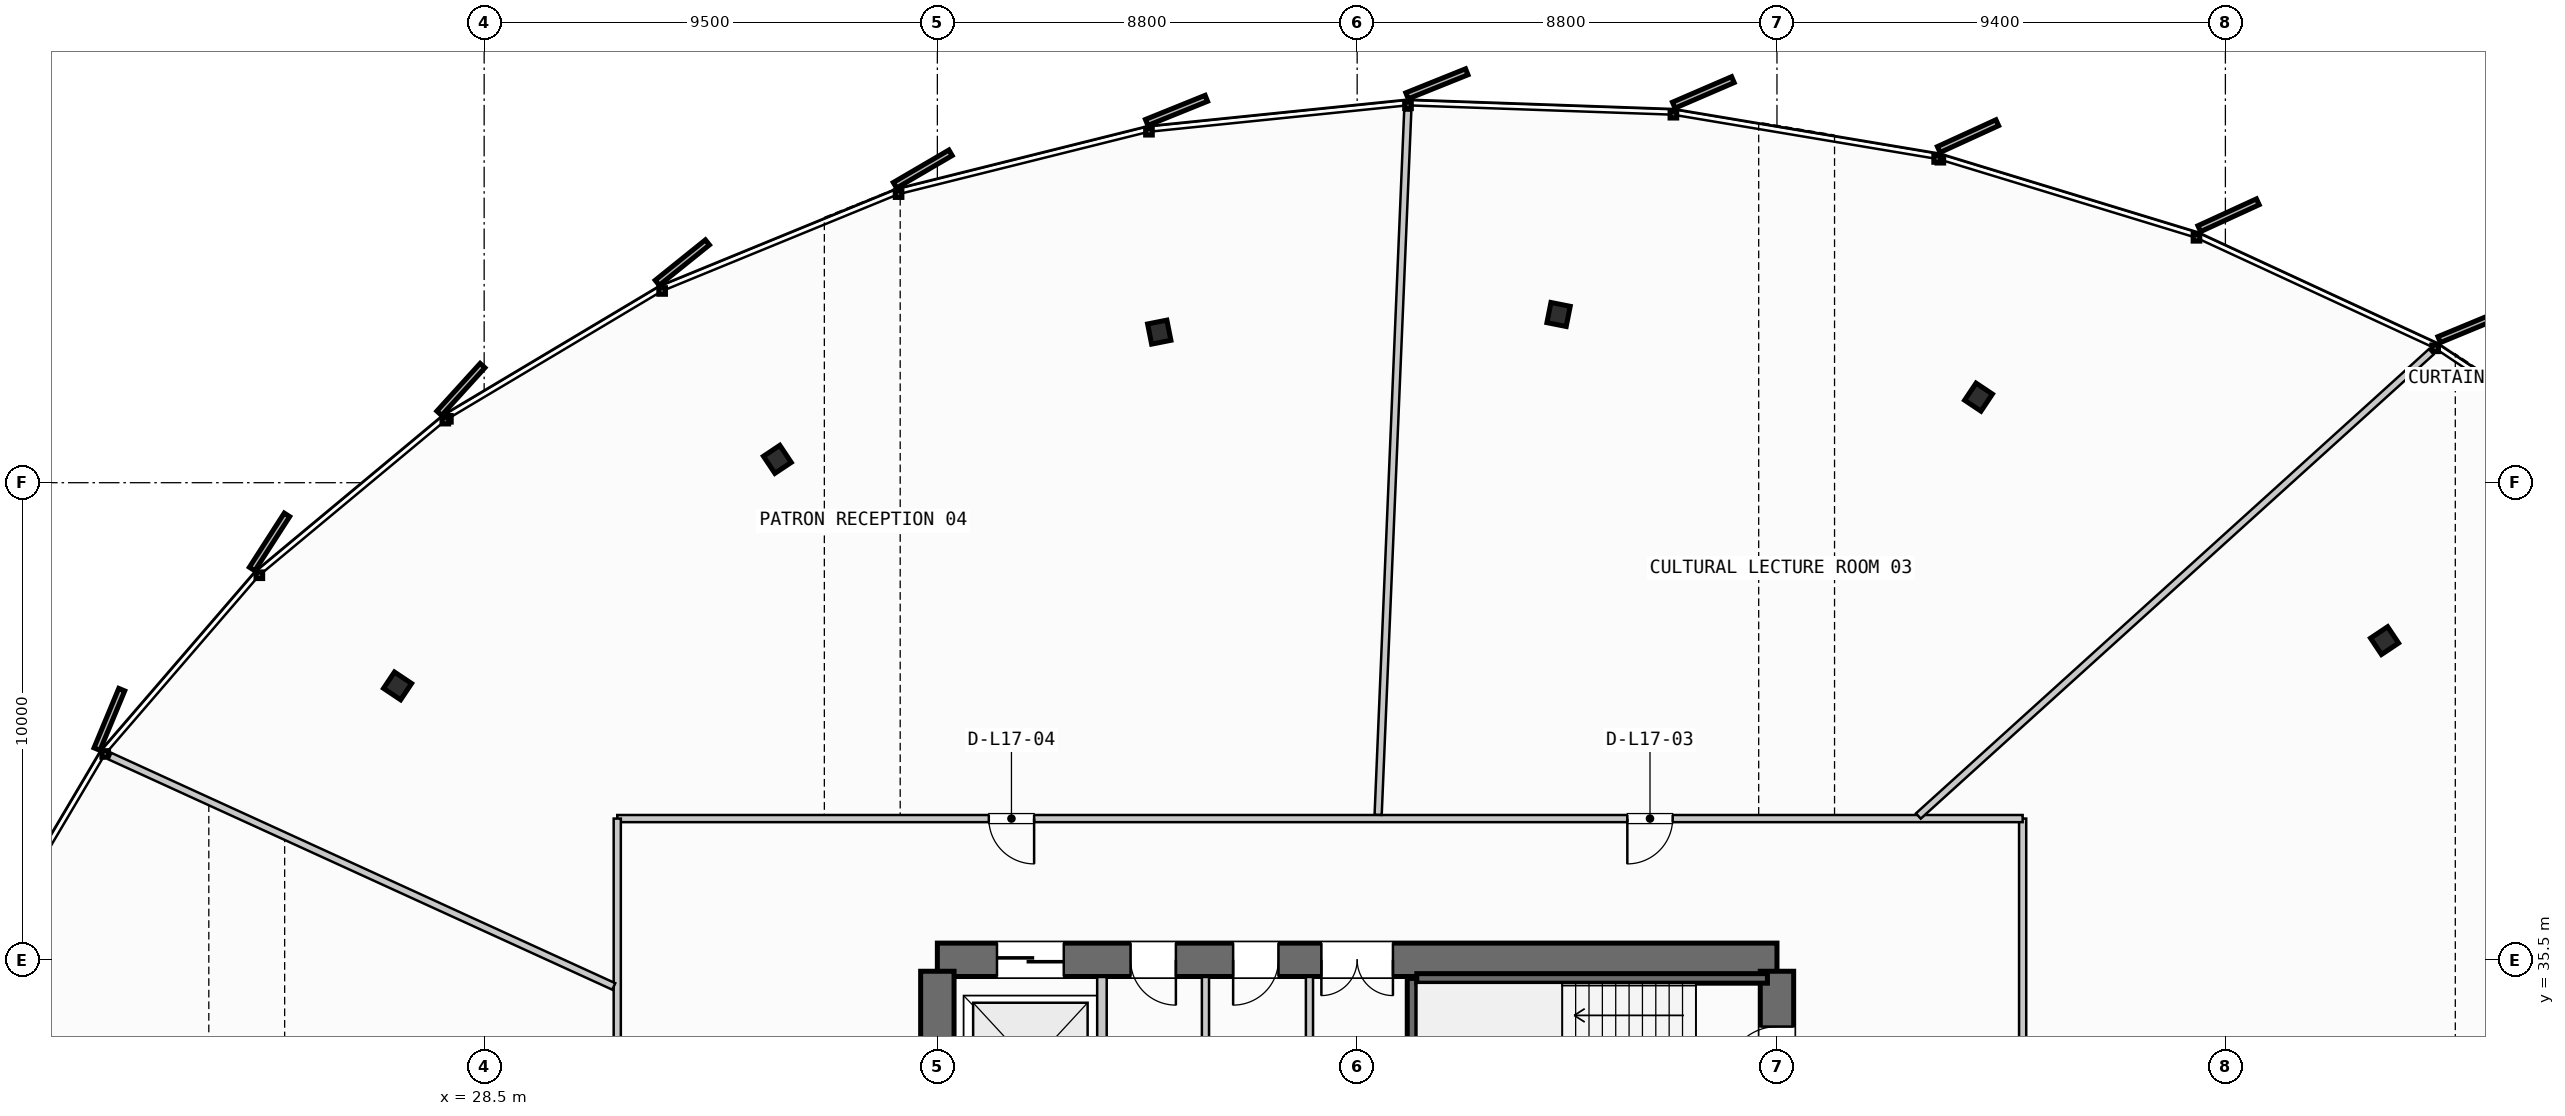
"""IFC4 building model, lengths in metres.
Left out: names, types, materials, properties, quantities, classifications, styles, units other than length and angle.
Written with IfcOpenShell. Run it as: python <this file> out.ifc"""

import sys

from ifc_helpers import new_model, si_unit, direction, frame, frame_2d, origin, origin_2d, place, context, subcontext, project, spatial, rectangle, i_section, extrude, source, transform, mapped, element, fill, save


model = new_model("IFC4")
c1 = context("Model", 3, precision=1e-05, world=origin(), true_north=direction((0.0, 1.0)))
c2 = subcontext(c1, "Body", "Model", "MODEL_VIEW")
j1 = project(units=[si_unit("LENGTHUNIT", "METRE"), si_unit("PLANEANGLEUNIT", "RADIAN")], contexts=[c1])
p1 = place(None, origin())
s1 = spatial("IfcSite", under=j1, at=p1, CompositionType="ELEMENT")
p2 = place(p1, origin())
s2 = spatial("IfcBuilding", under=s1, at=p2, CompositionType="ELEMENT")
p3 = place(p2, frame((0.0, 0.0, 71.4)))
s3 = spatial("IfcBuildingStorey", under=s2, at=p3, CompositionType="ELEMENT", Elevation=71.4)
p4 = place(p3, frame((55.6, 35.5, 0.0), z_axis=(0.0, 0.0, 1.0), x_axis=(-1.0, 0.0, 0.0)))
e1 = element("IfcWall", 1, at=p4, inside=s3, PredefinedType="SHEAR", context=c2, shape_type="SweptSolid", body=[
    extrude(rectangle(XDim=17.6, YDim=0.7, at=frame_2d((8.8, 0.0))), origin(), (0.0, 0.0, 1.0), 3.54),
])
p5 = place(p4, frame((8.05, 0.0, 0.0)))
e2 = element("IfcOpeningElement", 2, at=p5, cuts=e1, PredefinedType="OPENING", context=c2, shape_type="SweptSolid", body=[
    extrude(rectangle(XDim=1.5, YDim=2.2, at=frame_2d((0.75, 1.1))), frame((0.0, 0.36, 0.0), z_axis=(0.0, -1.0, 0.0), x_axis=(1.0, 0.0, 0.0)), (0.0, 0.0, 1.0), 0.72),
])
p6 = place(p4, frame((14.95, 0.0, 0.0)))
e3 = element("IfcOpeningElement", 3, at=p6, cuts=e1, PredefinedType="OPENING", context=c2, shape_type="SweptSolid", body=[
    extrude(rectangle(XDim=1.4, YDim=2.3, at=frame_2d((0.7, 1.15))), frame((0.0, 0.36, 0.0), z_axis=(0.0, -1.0, 0.0), x_axis=(1.0, 0.0, 0.0)), (0.0, 0.0, 1.0), 0.72),
])
p7 = place(p4, frame((12.6, 0.0, 0.0)))
e4 = element("IfcOpeningElement", 4, at=p7, cuts=e1, PredefinedType="OPENING", context=c2, shape_type="SweptSolid", body=[
    extrude(rectangle(XDim=0.95, YDim=2.15, at=frame_2d((0.475, 1.075))), frame((0.0, 0.36, 0.0), z_axis=(0.0, -1.0, 0.0), x_axis=(1.0, 0.0, 0.0)), (0.0, 0.0, 1.0), 0.72),
])
p8 = place(p4, frame((10.45, 0.0, 0.0)))
e5 = element("IfcOpeningElement", 5, at=p8, cuts=e1, PredefinedType="OPENING", context=c2, shape_type="SweptSolid", body=[
    extrude(rectangle(XDim=0.95, YDim=2.15, at=frame_2d((0.475, 1.075))), frame((0.0, 0.36, 0.0), z_axis=(0.0, -1.0, 0.0), x_axis=(1.0, 0.0, 0.0)), (0.0, 0.0, 1.0), 0.72),
])
p9 = place(p3, frame((38.0, 35.26, 0.0), z_axis=(0.0, 0.0, 1.0), x_axis=(0.0, -1.0, 0.0)))
e6 = element("IfcWall", 6, at=p9, inside=s3, PredefinedType="SHEAR", context=c2, shape_type="SweptSolid", body=[
    extrude(rectangle(XDim=14.92, YDim=0.7, at=frame_2d((7.46, 0.0))), origin(), (0.0, 0.0, 1.0), 3.54),
])
p10 = place(p9, frame((5.21, 0.0, 0.0)))
e7 = element("IfcOpeningElement", 7, at=p10, cuts=e6, PredefinedType="OPENING", context=c2, shape_type="SweptSolid", body=[
    extrude(rectangle(XDim=1.1, YDim=2.2, at=frame_2d((0.55, 1.1))), frame((0.0, 0.36, 0.0), z_axis=(0.0, -1.0, 0.0), x_axis=(1.0, 0.0, 0.0)), (0.0, 0.0, 1.0), 0.72),
])
p11 = place(p3, frame((55.6, 20.34, 0.0), z_axis=(0.0, 0.0, 1.0), x_axis=(0.0, 1.0, 0.0)))
e8 = element("IfcWall", 8, at=p11, inside=s3, PredefinedType="SHEAR", context=c2, shape_type="SweptSolid", body=[
    extrude(rectangle(XDim=14.92, YDim=0.7, at=frame_2d((7.46, 0.0))), origin(), (0.0, 0.0, 1.0), 3.54),
])
p12 = place(p11, frame((12.71, 0.0, 0.0)))
e9 = element("IfcOpeningElement", 9, at=p12, cuts=e8, PredefinedType="OPENING", context=c2, shape_type="SweptSolid", body=[
    extrude(rectangle(XDim=1.05, YDim=2.15, at=frame_2d((0.525, 1.075))), frame((0.0, 0.36, 0.0), z_axis=(0.0, -1.0, 0.0), x_axis=(1.0, 0.0, 0.0)), (0.0, 0.0, 1.0), 0.72),
])
p13 = place(p11, frame((8.61, 0.0, 0.0)))
e10 = element("IfcOpeningElement", 10, at=p13, cuts=e8, PredefinedType="OPENING", context=c2, shape_type="SweptSolid", body=[
    extrude(rectangle(XDim=1.1, YDim=2.2, at=frame_2d((0.55, 1.1))), frame((0.0, 0.36, 0.0), z_axis=(0.0, -1.0, 0.0), x_axis=(1.0, 0.0, 0.0)), (0.0, 0.0, 1.0), 0.72),
])
m1 = source(origin(), c2, "Body", "SweptSolid", [
    extrude(i_section(OverallWidth=0.412, OverallDepth=0.431, WebThickness=0.042, FlangeThickness=0.068, FilletRadius=0.015, at=origin_2d()), origin(), (0.0, 0.0, 1.0), 3.54),
])
for number, where, z_axis, x_axis in (
    (11, (68.336, 42.19, 0.0), (0.0, 0.0, 1.0), (0.831, 0.556, 0.0)),
    (12, (59.825, 47.293, 0.0), (0.0, 0.0, 1.0), (0.556, 0.831, 0.0)),
    (13, (51.022, 49.026, 0.0), (0.0, 0.0, 1.0), (0.195, 0.981, 0.0)),
    (14, (42.652, 48.656, 0.0), (0.0, 0.0, 1.0), (-0.195, 0.981, 0.0)),
    (15, (34.646, 45.99, 0.0), (0.0, 0.0, 1.0), (-0.556, 0.831, 0.0)),
    (16, (26.685, 41.241, 0.0), (0.0, 0.0, 1.0), (-0.831, 0.556, 0.0)),
):
    element("IfcColumn", number, at=place(p3, frame(where, z_axis=z_axis, x_axis=x_axis)), inside=s3, PredefinedType="COLUMN", context=c2, shape_type="MappedRepresentation", body=[
        mapped(m1, transform((0.0, 0.0, 0.0), scale=1.0)),
    ])
p14 = place(p3, frame((47.95, 32.05, 0.0), z_axis=(0.0, 0.0, 1.0), x_axis=(0.0, 1.0, 0.0)))
e17 = element("IfcWall", 17, at=p14, inside=s3, PredefinedType="SHEAR", context=c2, shape_type="SweptSolid", body=[
    extrude(rectangle(XDim=3.06, YDim=0.2, at=frame_2d((1.53, 0.0))), origin(), (0.0, 0.0, 1.0), 3.54),
])
p15 = place(p3, frame((48.05, 35.11, 0.0), z_axis=(0.0, 0.0, 1.0), x_axis=(1.0, 0.0, 0.0)))
e18 = element("IfcWall", 18, at=p15, inside=s3, PredefinedType="SHEAR", context=c2, shape_type="SweptSolid", body=[
    extrude(rectangle(XDim=7.35, YDim=0.2, at=frame_2d((3.675, 0.0))), origin(), (0.0, 0.0, 1.0), 3.54),
])
p16 = place(p3, frame((41.45, 31.85, 0.0), z_axis=(0.0, 0.0, 1.0), x_axis=(0.0, 1.0, 0.0)))
e19 = element("IfcWall", 19, at=p16, inside=s3, PredefinedType="PARTITIONING", context=c2, shape_type="SweptSolid", body=[
    extrude(rectangle(XDim=3.29, YDim=0.2, at=frame_2d((1.645, 0.0))), origin(), (0.0, 0.0, 1.0), 2.495),
])
p17 = place(p3, frame((45.8, 31.85, 0.0), z_axis=(0.0, 0.0, 1.0), x_axis=(0.0, 1.0, 0.0)))
e20 = element("IfcWall", 20, at=p17, inside=s3, PredefinedType="PARTITIONING", context=c2, shape_type="SweptSolid", body=[
    extrude(rectangle(XDim=3.29, YDim=0.15, at=frame_2d((1.645, 0.0))), origin(), (0.0, 0.0, 1.0), 2.495),
])
p18 = place(p3, frame((43.62, 31.85, 0.0), z_axis=(0.0, 0.0, 1.0), x_axis=(0.0, 1.0, 0.0)))
e21 = element("IfcWall", 21, at=p18, inside=s3, PredefinedType="PLUMBINGWALL", context=c2, shape_type="SweptSolid", body=[
    extrude(rectangle(XDim=3.29, YDim=0.15, at=frame_2d((1.645, 0.0))), origin(), (0.0, 0.0, 1.0), 2.495),
])
p19 = place(p3, frame((60.75, 17.14, 0.0), z_axis=(0.0, 0.0, 1.0), x_axis=(0.0, 1.0, 0.0)))
e22 = element("IfcWall", 22, at=p19, inside=s3, PredefinedType="PARTITIONING", context=c2, shape_type="SweptSolid", body=[
    extrude(rectangle(XDim=21.32, YDim=0.15, at=frame_2d((10.66, 0.0))), origin(), (0.0, 0.0, 1.0), 2.495),
])
p20 = place(p19, frame((12.321, 0.0, 0.0)))
e23 = element("IfcOpeningElement", 23, at=p20, cuts=e22, PredefinedType="OPENING", context=c2, shape_type="SweptSolid", body=[
    extrude(rectangle(XDim=0.95, YDim=2.15, at=frame_2d((0.475, 1.075))), frame((0.0, 0.085, 0.0), z_axis=(0.0, -1.0, 0.0), x_axis=(1.0, 0.0, 0.0)), (0.0, 0.0, 1.0), 0.17),
])
p21 = place(p3, frame((60.75, 38.46, 0.0), z_axis=(0.0, 0.0, 1.0), x_axis=(-1.0, 0.0, 0.0)))
e24 = element("IfcWall", 24, at=p21, inside=s3, PredefinedType="PARTITIONING", context=c2, shape_type="SweptSolid", body=[
    extrude(rectangle(XDim=29.46, YDim=0.15, at=frame_2d((14.73, 0.0))), origin(), (0.0, 0.0, 1.0), 2.495),
])
p22 = place(p21, frame((7.337, 0.0, 0.0)))
e25 = element("IfcOpeningElement", 25, at=p22, cuts=e24, PredefinedType="OPENING", context=c2, shape_type="SweptSolid", body=[
    extrude(rectangle(XDim=0.95, YDim=2.15, at=frame_2d((0.475, 1.075))), frame((0.0, 0.085, 0.0), z_axis=(0.0, -1.0, 0.0), x_axis=(1.0, 0.0, 0.0)), (0.0, 0.0, 1.0), 0.17),
])
p23 = place(p21, frame((20.722, 0.0, 0.0)))
e26 = element("IfcOpeningElement", 26, at=p23, cuts=e24, PredefinedType="OPENING", context=c2, shape_type="SweptSolid", body=[
    extrude(rectangle(XDim=0.95, YDim=2.15, at=frame_2d((0.475, 1.075))), frame((0.0, 0.085, 0.0), z_axis=(0.0, -1.0, 0.0), x_axis=(1.0, 0.0, 0.0)), (0.0, 0.0, 1.0), 0.17),
])
p24 = place(p3, frame((31.29, 38.46, 0.0), z_axis=(0.0, 0.0, 1.0), x_axis=(0.0, -1.0, 0.0)))
e27 = element("IfcWall", 27, at=p24, inside=s3, PredefinedType="PARTITIONING", context=c2, shape_type="SweptSolid", body=[
    extrude(rectangle(XDim=21.32, YDim=0.15, at=frame_2d((10.66, 0.0))), origin(), (0.0, 0.0, 1.0), 2.495),
])
p25 = place(p24, frame((10.502, 0.0, 0.0)))
e28 = element("IfcOpeningElement", 28, at=p25, cuts=e27, PredefinedType="OPENING", context=c2, shape_type="SweptSolid", body=[
    extrude(rectangle(XDim=0.95, YDim=2.15, at=frame_2d((0.475, 1.075))), frame((0.0, 0.085, 0.0), z_axis=(0.0, -1.0, 0.0), x_axis=(1.0, 0.0, 0.0)), (0.0, 0.0, 1.0), 0.17),
])
p26 = place(p3, frame((58.564, 38.514, 0.0), z_axis=(0.0, 0.0, 1.0), x_axis=(0.741451212239, 0.671006780793, 0.0)))
e29 = element("IfcWall", 29, at=p26, inside=s3, PredefinedType="PARTITIONING", context=c2, shape_type="SweptSolid", body=[
    extrude(rectangle(XDim=14.5, YDim=0.15, at=frame_2d((7.25, 0.0))), origin(), (0.0, 0.0, 1.0), 2.495),
])
p27 = place(p3, frame((47.24, 38.54, 0.0), z_axis=(0.0, 0.0, 1.0), x_axis=(0.042040900866, 0.999115890502, 0.0)))
e30 = element("IfcWall", 30, at=p27, inside=s3, PredefinedType="PARTITIONING", context=c2, shape_type="SweptSolid", body=[
    extrude(rectangle(XDim=14.773, YDim=0.15, at=frame_2d((7.387, 0.0))), origin(), (0.0, 0.0, 1.0), 2.495),
])
p28 = place(p3, frame((31.217, 34.942, 0.0), z_axis=(0.0, 0.0, 1.0), x_axis=(-0.909514903572, 0.415671312673, 0.0)))
e31 = element("IfcWall", 31, at=p28, inside=s3, PredefinedType="PARTITIONING", context=c2, shape_type="SweptSolid", body=[
    extrude(rectangle(XDim=11.612, YDim=0.15, at=frame_2d((5.806, 0.0))), origin(), (0.0, 0.0, 1.0), 2.495),
])
m2 = source(origin(), c2, "Body", "SweptSolid", [
    extrude(rectangle(XDim=1.05, YDim=2.15, at=frame_2d((0.525, 1.075))), frame((0.0, 0.025, 0.0), z_axis=(0.0, -1.0, 0.0), x_axis=(1.0, 0.0, 0.0)), (0.0, 0.0, 1.0), 0.05),
])
p29 = place(p12, origin())
e32 = element("IfcDoor", 32, at=p29, inside=s3, OperationType="SINGLE_SWING_LEFT", PredefinedType="DOOR", context=c2, shape_type="MappedRepresentation", body=[
    mapped(m2, transform((0.0, 0.0, 0.0), scale=1.0)),
])
fill(e9, e32)
m3 = source(origin(), c2, "Body", "SweptSolid", [
    extrude(rectangle(XDim=1.5, YDim=2.2, at=frame_2d((0.75, 1.1))), frame((0.0, 0.025, 0.0), z_axis=(0.0, -1.0, 0.0), x_axis=(1.0, 0.0, 0.0)), (0.0, 0.0, 1.0), 0.05),
])
p30 = place(p5, origin())
e33 = element("IfcDoor", 33, at=p30, inside=s3, OperationType="DOUBLE_DOOR_SINGLE_SWING", PredefinedType="DOOR", context=c2, shape_type="MappedRepresentation", body=[
    mapped(m3, transform((0.0, 0.0, 0.0), scale=1.0)),
])
fill(e2, e33)
m4 = source(origin(), c2, "Body", "SweptSolid", [
    extrude(rectangle(XDim=1.4, YDim=2.3, at=frame_2d((0.7, 1.15))), frame((0.0, 0.025, 0.0), z_axis=(0.0, -1.0, 0.0), x_axis=(1.0, 0.0, 0.0)), (0.0, 0.0, 1.0), 0.05),
])
p31 = place(p6, origin())
e34 = element("IfcDoor", 34, at=p31, inside=s3, OperationType="SLIDING_TO_RIGHT", PredefinedType="DOOR", context=c2, shape_type="MappedRepresentation", body=[
    mapped(m4, transform((0.0, 0.0, 0.0), scale=1.0)),
])
fill(e3, e34)
m5 = source(origin(), c2, "Body", "SweptSolid", [
    extrude(rectangle(XDim=0.95, YDim=2.15, at=frame_2d((0.475, 1.075))), frame((0.0, 0.025, 0.0), z_axis=(0.0, -1.0, 0.0), x_axis=(1.0, 0.0, 0.0)), (0.0, 0.0, 1.0), 0.05),
])
p32 = place(p7, origin())
e35 = element("IfcDoor", 35, at=p32, inside=s3, OperationType="SINGLE_SWING_LEFT", PredefinedType="DOOR", context=c2, shape_type="MappedRepresentation", body=[
    mapped(m5, transform((0.0, 0.0, 0.0), scale=1.0)),
])
fill(e4, e35)
p33 = place(p8, origin())
e36 = element("IfcDoor", 36, at=p33, inside=s3, OperationType="SINGLE_SWING_RIGHT", PredefinedType="DOOR", context=c2, shape_type="MappedRepresentation", body=[
    mapped(m5, transform((0.0, 0.0, 0.0), scale=1.0)),
])
fill(e5, e36)
p34 = place(p22, origin())
e37 = element("IfcDoor", 37, at=p34, inside=s3, OperationType="SINGLE_SWING_RIGHT", PredefinedType="DOOR", context=c2, shape_type="MappedRepresentation", body=[
    mapped(m5, transform((0.0, 0.0, 0.0), scale=1.0)),
])
fill(e25, e37)
p35 = place(p23, origin())
e38 = element("IfcDoor", 38, at=p35, inside=s3, OperationType="SINGLE_SWING_LEFT", PredefinedType="DOOR", context=c2, shape_type="MappedRepresentation", body=[
    mapped(m5, transform((0.0, 0.0, 0.0), scale=1.0)),
])
fill(e26, e38)
save(model, sys.argv[1])
